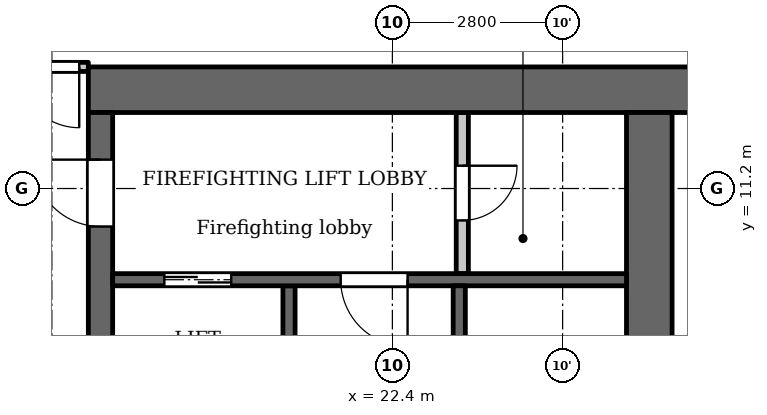
"""IFC4 building model, lengths in metres.
Left out: names, types, materials, properties, quantities, classifications, styles, units other than length and angle.
Written with IfcOpenShell. Run it as: python <this file> out.ifc"""

import sys

from ifc_helpers import new_model, si_unit, direction, frame, frame_2d, origin, place, context, subcontext, project, spatial, rectangle, extrude, element, fill, save


model = new_model("IFC4")
c1 = context("Model", 3, precision=1e-05, world=origin(), true_north=direction((0.0, 1.0)))
c2 = subcontext(c1, "Body", "Model", "MODEL_VIEW")
j1 = project(units=[si_unit("LENGTHUNIT", "METRE"), si_unit("PLANEANGLEUNIT", "RADIAN")], contexts=[c1])
p1 = place(None, origin())
s1 = spatial("IfcSite", under=j1, at=p1, CompositionType="ELEMENT")
p2 = place(p1, origin())
s2 = spatial("IfcBuilding", under=s1, at=p2, CompositionType="ELEMENT")
p3 = place(p2, frame((0.0, 0.0, 160.6)))
s3 = spatial("IfcBuildingStorey", under=s2, at=p3, CompositionType="ELEMENT", Elevation=160.6)
p4 = place(p3, frame((20.7, 2.6, 0.0), z_axis=(0.0, 0.0, 1.0), x_axis=(0.0, 1.0, 0.0)))
e1 = element("IfcWall", 1, at=p4, inside=s3, PredefinedType="SHEAR", context=c2, shape_type="SweptSolid", body=[
    extrude(rectangle(XDim=7.0, YDim=0.2, at=frame_2d((3.5, 0.0))), origin(), (0.0, 0.0, 1.0), 3.2),
])
p5 = place(p3, frame((17.4, 12.825, 0.0), z_axis=(0.0, 0.0, 1.0), x_axis=(1.0, 0.0, 0.0)))
e2 = element("IfcWall", 2, at=p5, inside=s3, PredefinedType="SHEAR", context=c2, shape_type="SweptSolid", body=[
    extrude(rectangle(XDim=10.4, YDim=0.75, at=frame_2d((5.2, 0.0))), origin(), (0.0, 0.0, 1.0), 3.2),
])
p6 = place(p3, frame((17.6, -12.45, 0.0), z_axis=(0.0, 0.0, 1.0), x_axis=(0.0, 1.0, 0.0)))
e3 = element("IfcWall", 3, at=p6, inside=s3, PredefinedType="SHEAR", context=c2, shape_type="SweptSolid", body=[
    extrude(rectangle(XDim=24.9, YDim=0.4, at=frame_2d((12.45, 0.0))), origin(), (0.0, 0.0, 1.0), 3.2),
])
p7 = place(p6, frame((8.65, 0.0, 0.0)))
e4 = element("IfcOpeningElement", 4, at=p7, cuts=e3, PredefinedType="OPENING", context=c2, shape_type="SweptSolid", body=[
    extrude(rectangle(XDim=0.9, YDim=2.1, at=frame_2d((0.45, 1.05))), frame((0.0, 0.21, 0.0), z_axis=(0.0, -1.0, 0.0), x_axis=(1.0, 0.0, 0.0)), (0.0, 0.0, 1.0), 0.42),
])
p8 = place(p6, frame((15.6, 0.0, 0.0)))
e5 = element("IfcOpeningElement", 5, at=p8, cuts=e3, PredefinedType="OPENING", context=c2, shape_type="SweptSolid", body=[
    extrude(rectangle(XDim=1.1, YDim=2.1, at=frame_2d((0.55, 1.05))), frame((0.0, 0.21, 0.0), z_axis=(0.0, -1.0, 0.0), x_axis=(1.0, 0.0, 0.0)), (0.0, 0.0, 1.0), 0.42),
])
p9 = place(p6, frame((18.0, 0.0, 0.0)))
e6 = element("IfcOpeningElement", 6, at=p9, cuts=e3, PredefinedType="OPENING", context=c2, shape_type="SweptSolid", body=[
    extrude(rectangle(XDim=1.1, YDim=2.1, at=frame_2d((0.55, 1.05))), frame((0.0, 0.21, 0.0), z_axis=(0.0, -1.0, 0.0), x_axis=(1.0, 0.0, 0.0)), (0.0, 0.0, 1.0), 0.42),
])
p10 = place(p6, frame((23.025, 0.0, 0.0)))
e7 = element("IfcOpeningElement", 7, at=p10, cuts=e3, PredefinedType="OPENING", context=c2, shape_type="SweptSolid", body=[
    extrude(rectangle(XDim=1.1, YDim=2.1, at=frame_2d((0.55, 1.05))), frame((0.0, 0.21, 0.0), z_axis=(0.0, -1.0, 0.0), x_axis=(1.0, 0.0, 0.0)), (0.0, 0.0, 1.0), 0.42),
])
p11 = place(p6, frame((0.775, 0.0, 0.0)))
e8 = element("IfcOpeningElement", 8, at=p11, cuts=e3, PredefinedType="OPENING", context=c2, shape_type="SweptSolid", body=[
    extrude(rectangle(XDim=1.1, YDim=2.1, at=frame_2d((0.55, 1.05))), frame((0.0, 0.21, 0.0), z_axis=(0.0, -1.0, 0.0), x_axis=(1.0, 0.0, 0.0)), (0.0, 0.0, 1.0), 0.42),
])
p12 = place(p6, frame((12.925, 0.0, 0.0)))
e9 = element("IfcOpeningElement", 9, at=p12, cuts=e3, PredefinedType="OPENING", context=c2, shape_type="SweptSolid", body=[
    extrude(rectangle(XDim=1.8, YDim=2.1, at=frame_2d((0.9, 1.05))), frame((0.0, 0.21, 0.0), z_axis=(0.0, -1.0, 0.0), x_axis=(1.0, 0.0, 0.0)), (0.0, 0.0, 1.0), 0.42),
])
p13 = place(p3, frame((26.625, -12.45, 0.0), z_axis=(0.0, 0.0, 1.0), x_axis=(0.0, 1.0, 0.0)))
e10 = element("IfcWall", 10, at=p13, inside=s3, PredefinedType="SHEAR", context=c2, shape_type="SweptSolid", body=[
    extrude(rectangle(XDim=24.9, YDim=0.75, at=frame_2d((12.45, 0.0))), origin(), (0.0, 0.0, 1.0), 3.2),
])
p14 = place(p3, frame((23.55, 9.8, 0.0), z_axis=(0.0, 0.0, 1.0), x_axis=(0.0, 1.0, 0.0)))
e11 = element("IfcWall", 11, at=p14, inside=s3, PredefinedType="PARTITIONING", context=c2, shape_type="SweptSolid", body=[
    extrude(rectangle(XDim=2.65, YDim=0.2, at=frame_2d((1.325, 0.0))), origin(), (0.0, 0.0, 1.0), 3.2),
])
p15 = place(p14, frame((0.875, 0.0, 0.0)))
e12 = element("IfcOpeningElement", 12, at=p15, cuts=e11, PredefinedType="OPENING", context=c2, shape_type="SweptSolid", body=[
    extrude(rectangle(XDim=0.9, YDim=2.1, at=frame_2d((0.45, 1.05))), frame((0.0, 0.11, 0.0), z_axis=(0.0, -1.0, 0.0), x_axis=(1.0, 0.0, 0.0)), (0.0, 0.0, 1.0), 0.22),
])
p16 = place(p3, frame((17.8, 9.7, 0.0), z_axis=(0.0, 0.0, 1.0), x_axis=(1.0, 0.0, 0.0)))
e13 = element("IfcWall", 13, at=p16, inside=s3, PredefinedType="SHEAR", context=c2, shape_type="SweptSolid", body=[
    extrude(rectangle(XDim=8.45, YDim=0.2, at=frame_2d((4.225, 0.0))), origin(), (0.0, 0.0, 1.0), 3.2),
])
p17 = place(p16, frame((0.85, 0.0, 0.0)))
e14 = element("IfcOpeningElement", 14, at=p17, cuts=e13, PredefinedType="OPENING", context=c2, shape_type="SweptSolid", body=[
    extrude(rectangle(XDim=1.1, YDim=2.1, at=frame_2d((0.55, 1.05))), frame((0.0, 0.11, 0.0), z_axis=(0.0, -1.0, 0.0), x_axis=(1.0, 0.0, 0.0)), (0.0, 0.0, 1.0), 0.22),
])
p18 = place(p16, frame((3.75, 0.0, 0.0)))
e15 = element("IfcOpeningElement", 15, at=p18, cuts=e13, PredefinedType="OPENING", context=c2, shape_type="SweptSolid", body=[
    extrude(rectangle(XDim=1.1, YDim=2.1, at=frame_2d((0.55, 1.05))), frame((0.0, 0.11, 0.0), z_axis=(0.0, -1.0, 0.0), x_axis=(1.0, 0.0, 0.0)), (0.0, 0.0, 1.0), 0.22),
])
p19 = place(p3, frame((23.5, 2.6, 0.0), z_axis=(0.0, 0.0, 1.0), x_axis=(0.0, 1.0, 0.0)))
e16 = element("IfcWall", 16, at=p19, inside=s3, PredefinedType="SHEAR", context=c2, shape_type="SweptSolid", body=[
    extrude(rectangle(XDim=7.0, YDim=0.2, at=frame_2d((3.5, 0.0))), origin(), (0.0, 0.0, 1.0), 3.2),
])
p20 = place(p3, frame((-17.4, 13.2, 0.0), z_axis=(0.0, 0.0, 1.0), x_axis=(1.0, 0.0, 0.0)))
e17 = element("IfcWall", 17, at=p20, inside=s3, PredefinedType="PARTITIONING", context=c2, shape_type="SweptSolid", body=[
    extrude(rectangle(XDim=34.8, YDim=0.15, at=frame_2d((17.4, 0.0))), origin(), (0.0, 0.0, 1.0), 3.2),
])
p21 = place(p20, frame((0.25, 0.0, 0.0)))
e18 = element("IfcOpeningElement", 18, at=p21, cuts=e17, PredefinedType="OPENING", context=c2, shape_type="SweptSolid", body=[
    extrude(rectangle(XDim=1.0, YDim=2.1, at=frame_2d((0.5, 1.05))), frame((0.0, 0.085, 0.0), z_axis=(0.0, -1.0, 0.0), x_axis=(1.0, 0.0, 0.0)), (0.0, 0.0, 1.0), 0.17),
])
p22 = place(p20, frame((33.65, 0.0, 0.0)))
e19 = element("IfcOpeningElement", 19, at=p22, cuts=e17, PredefinedType="OPENING", context=c2, shape_type="SweptSolid", body=[
    extrude(rectangle(XDim=1.0, YDim=2.1, at=frame_2d((0.5, 1.05))), frame((0.0, 0.085, 0.0), z_axis=(0.0, -1.0, 0.0), x_axis=(1.0, 0.0, 0.0)), (0.0, 0.0, 1.0), 0.17),
])
p23 = place(p20, frame((15.75, 0.0, 0.0)))
e20 = element("IfcOpeningElement", 20, at=p23, cuts=e17, PredefinedType="OPENING", context=c2, shape_type="SweptSolid", body=[
    extrude(rectangle(XDim=1.0, YDim=2.1, at=frame_2d((0.5, 1.05))), frame((0.0, 0.085, 0.0), z_axis=(0.0, -1.0, 0.0), x_axis=(1.0, 0.0, 0.0)), (0.0, 0.0, 1.0), 0.17),
])
p24 = place(p20, frame((20.85, 0.0, 0.0)))
e21 = element("IfcOpeningElement", 21, at=p24, cuts=e17, PredefinedType="OPENING", context=c2, shape_type="SweptSolid", body=[
    extrude(rectangle(XDim=1.0, YDim=2.1, at=frame_2d((0.5, 1.05))), frame((0.0, 0.085, 0.0), z_axis=(0.0, -1.0, 0.0), x_axis=(1.0, 0.0, 0.0)), (0.0, 0.0, 1.0), 0.17),
])
p25 = place(p20, frame((23.55, 0.0, 0.0)))
e22 = element("IfcOpeningElement", 22, at=p25, cuts=e17, PredefinedType="OPENING", context=c2, shape_type="SweptSolid", body=[
    extrude(rectangle(XDim=1.0, YDim=2.1, at=frame_2d((0.5, 1.05))), frame((0.0, 0.085, 0.0), z_axis=(0.0, -1.0, 0.0), x_axis=(1.0, 0.0, 0.0)), (0.0, 0.0, 1.0), 0.17),
])
p26 = place(p17, origin())
e23 = element("IfcDoor", 23, at=p26, inside=s3, OperationType="DOUBLE_DOOR_SLIDING", PredefinedType="DOOR", context=c2, shape_type="SweptSolid", body=[
    extrude(rectangle(XDim=1.1, YDim=2.1, at=frame_2d((0.55, 1.05))), frame((0.0, 0.025, 0.0), z_axis=(0.0, -1.0, 0.0), x_axis=(1.0, 0.0, 0.0)), (0.0, 0.0, 1.0), 0.05),
])
fill(e14, e23)
p27 = place(p10, origin())
e24 = element("IfcDoor", 24, at=p27, inside=s3, OperationType="SINGLE_SWING_LEFT", PredefinedType="DOOR", context=c2, shape_type="SweptSolid", body=[
    extrude(rectangle(XDim=1.1, YDim=2.1, at=frame_2d((0.55, 1.05))), frame((0.0, 0.025, 0.0), z_axis=(0.0, -1.0, 0.0), x_axis=(1.0, 0.0, 0.0)), (0.0, 0.0, 1.0), 0.05),
])
fill(e7, e24)
p28 = place(p15, origin())
e25 = element("IfcDoor", 25, at=p28, inside=s3, OperationType="SINGLE_SWING_RIGHT", PredefinedType="DOOR", context=c2, shape_type="SweptSolid", body=[
    extrude(rectangle(XDim=0.9, YDim=2.1, at=frame_2d((0.45, 1.05))), frame((0.0, 0.025, 0.0), z_axis=(0.0, -1.0, 0.0), x_axis=(1.0, 0.0, 0.0)), (0.0, 0.0, 1.0), 0.05),
])
fill(e12, e25)
p29 = place(p18, origin())
e26 = element("IfcDoor", 26, at=p29, inside=s3, OperationType="SINGLE_SWING_RIGHT", PredefinedType="DOOR", context=c2, shape_type="SweptSolid", body=[
    extrude(rectangle(XDim=1.1, YDim=2.1, at=frame_2d((0.55, 1.05))), frame((0.0, 0.025, 0.0), z_axis=(0.0, -1.0, 0.0), x_axis=(1.0, 0.0, 0.0)), (0.0, 0.0, 1.0), 0.05),
])
fill(e15, e26)
p30 = place(p22, origin())
e27 = element("IfcDoor", 27, at=p30, inside=s3, OperationType="SINGLE_SWING_RIGHT", PredefinedType="DOOR", context=c2, shape_type="SweptSolid", body=[
    extrude(rectangle(XDim=1.0, YDim=2.1, at=frame_2d((0.5, 1.05))), frame((0.0, 0.025, 0.0), z_axis=(0.0, -1.0, 0.0), x_axis=(1.0, 0.0, 0.0)), (0.0, 0.0, 1.0), 0.05),
])
fill(e19, e27)
save(model, sys.argv[1])
